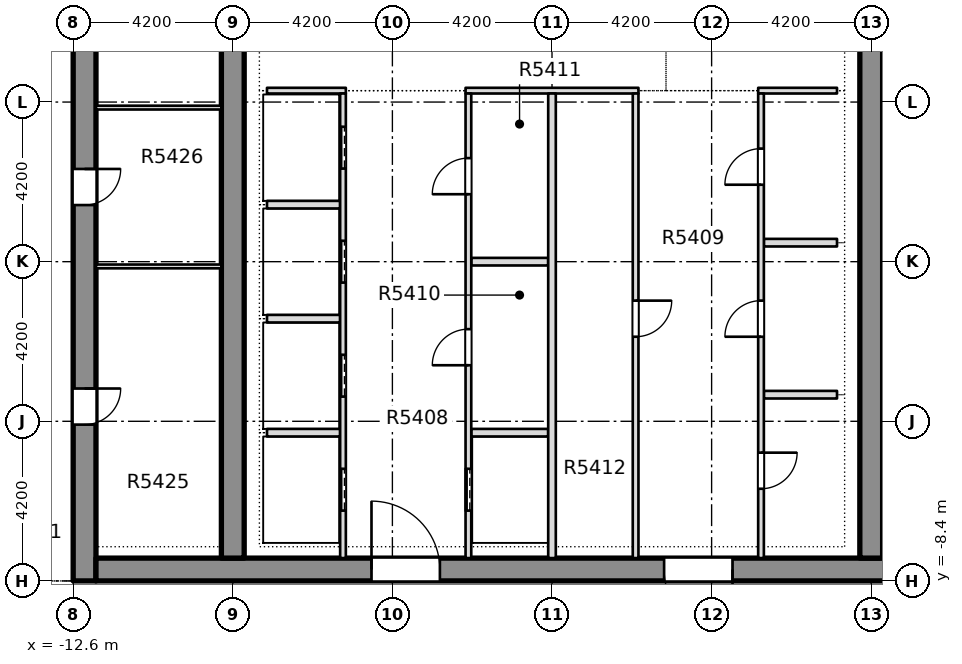
"""IFC4 building model, lengths in metres.
Left out: names, types, materials, properties, quantities, classifications, styles, units other than length and angle.
Written with IfcOpenShell. Run it as: python <this file> out.ifc"""

import sys

from ifc_helpers import new_model, si_unit, direction, frame, frame_2d, origin, place, context, subcontext, project, spatial, rectangle, extrude, element, fill, save


model = new_model("IFC4")
c1 = context("Model", 3, precision=1e-05, world=origin(), true_north=direction((0.0, 1.0)))
c2 = subcontext(c1, "Body", "Model", "MODEL_VIEW")
j1 = project(units=[si_unit("LENGTHUNIT", "METRE"), si_unit("PLANEANGLEUNIT", "RADIAN")], contexts=[c1])
p1 = place(None, origin())
s1 = spatial("IfcSite", under=j1, at=p1, CompositionType="ELEMENT")
p2 = place(p1, origin())
s2 = spatial("IfcBuilding", under=s1, at=p2, CompositionType="ELEMENT")
p3 = place(p2, frame((0.0, 0.0, 206.6)))
s3 = spatial("IfcBuildingStorey", under=s2, at=p3, CompositionType="ELEMENT", Elevation=206.6)
p4 = place(p3, frame((-12.3, -8.4, -0.4), z_axis=(0.0, 0.0, 1.0), x_axis=(0.0, 1.0, 0.0)))
e1 = element("IfcWall", 1, at=p4, inside=s3, PredefinedType="SHEAR", context=c2, shape_type="SweptSolid", body=[
    extrude(rectangle(XDim=30.15, YDim=0.6, at=frame_2d((15.075, 0.0))), origin(), (0.0, 0.0, 1.0), 3.45),
])
p5 = place(p4, frame((4.113, 0.0, 0.4)))
e2 = element("IfcOpeningElement", 2, at=p5, cuts=e1, PredefinedType="OPENING", context=c2, shape_type="SweptSolid", body=[
    extrude(rectangle(XDim=0.95, YDim=2.1, at=frame_2d((0.475, 1.05))), frame((0.0, 0.31, 0.0), z_axis=(0.0, -1.0, 0.0), x_axis=(1.0, 0.0, 0.0)), (0.0, 0.0, 1.0), 0.62),
])
p6 = place(p4, frame((9.89, 0.0, 0.4)))
e3 = element("IfcOpeningElement", 3, at=p6, cuts=e1, PredefinedType="OPENING", context=c2, shape_type="SweptSolid", body=[
    extrude(rectangle(XDim=0.95, YDim=2.1, at=frame_2d((0.475, 1.05))), frame((0.0, 0.31, 0.0), z_axis=(0.0, -1.0, 0.0), x_axis=(1.0, 0.0, 0.0)), (0.0, 0.0, 1.0), 0.62),
])
p7 = place(p4, frame((15.052, 0.0, 0.4)))
e4 = element("IfcOpeningElement", 4, at=p7, cuts=e1, PredefinedType="OPENING", context=c2, shape_type="SweptSolid", body=[
    extrude(rectangle(XDim=0.95, YDim=2.1, at=frame_2d((0.475, 1.05))), frame((0.0, 0.31, 0.0), z_axis=(0.0, -1.0, 0.0), x_axis=(1.0, 0.0, 0.0)), (0.0, 0.0, 1.0), 0.62),
])
p8 = place(p4, frame((22.144, 0.0, 0.4)))
e5 = element("IfcOpeningElement", 5, at=p8, cuts=e1, PredefinedType="OPENING", context=c2, shape_type="SweptSolid", body=[
    extrude(rectangle(XDim=0.95, YDim=2.1, at=frame_2d((0.475, 1.05))), frame((0.0, 0.31, 0.0), z_axis=(0.0, -1.0, 0.0), x_axis=(1.0, 0.0, 0.0)), (0.0, 0.0, 1.0), 0.62),
])
p9 = place(p4, frame((24.998, 0.0, 0.4)))
e6 = element("IfcOpeningElement", 6, at=p9, cuts=e1, PredefinedType="OPENING", context=c2, shape_type="SweptSolid", body=[
    extrude(rectangle(XDim=0.95, YDim=2.1, at=frame_2d((0.475, 1.05))), frame((0.0, 0.31, 0.0), z_axis=(0.0, -1.0, 0.0), x_axis=(1.0, 0.0, 0.0)), (0.0, 0.0, 1.0), 0.62),
])
p10 = place(p4, frame((27.605, 0.0, 0.4)))
e7 = element("IfcOpeningElement", 7, at=p10, cuts=e1, PredefinedType="OPENING", context=c2, shape_type="SweptSolid", body=[
    extrude(rectangle(XDim=0.95, YDim=2.1, at=frame_2d((0.475, 1.05))), frame((0.0, 0.31, 0.0), z_axis=(0.0, -1.0, 0.0), x_axis=(1.0, 0.0, 0.0)), (0.0, 0.0, 1.0), 0.62),
])
p11 = place(p4, frame((19.3, 0.0, 0.4)))
e8 = element("IfcOpeningElement", 8, at=p11, cuts=e1, PredefinedType="OPENING", context=c2, shape_type="SweptSolid", body=[
    extrude(rectangle(XDim=1.2, YDim=2.1, at=frame_2d((0.6, 1.05))), frame((0.0, 0.31, 0.0), z_axis=(0.0, -1.0, 0.0), x_axis=(1.0, 0.0, 0.0)), (0.0, 0.0, 1.0), 0.62),
])
p12 = place(p3, frame((-12.0, -8.1, -0.4), z_axis=(0.0, 0.0, 1.0), x_axis=(1.0, 0.0, 0.0)))
e9 = element("IfcWall", 9, at=p12, inside=s3, PredefinedType="SHEAR", context=c2, shape_type="SweptSolid", body=[
    extrude(rectangle(XDim=24.0, YDim=0.6, at=frame_2d((12.0, 0.0))), origin(), (0.0, 0.0, 1.0), 3.45),
])
p13 = place(p12, frame((7.25, 0.0, 0.4)))
e10 = element("IfcOpeningElement", 10, at=p13, cuts=e9, PredefinedType="OPENING", context=c2, shape_type="SweptSolid", body=[
    extrude(rectangle(XDim=1.8, YDim=2.1, at=frame_2d((0.9, 1.05))), frame((0.0, 0.31, 0.0), z_axis=(0.0, -1.0, 0.0), x_axis=(1.0, 0.0, 0.0)), (0.0, 0.0, 1.0), 0.62),
])
p14 = place(p12, frame((14.95, 0.0, 0.4)))
e11 = element("IfcOpeningElement", 11, at=p14, cuts=e9, PredefinedType="OPENING", context=c2, shape_type="SweptSolid", body=[
    extrude(rectangle(XDim=1.8, YDim=2.1, at=frame_2d((0.9, 1.05))), frame((0.0, 0.31, 0.0), z_axis=(0.0, -1.0, 0.0), x_axis=(1.0, 0.0, 0.0)), (0.0, 0.0, 1.0), 0.62),
])
p15 = place(p3, frame((-8.4, -7.8, -0.4), z_axis=(0.0, 0.0, 1.0), x_axis=(0.0, 1.0, 0.0)))
e12 = element("IfcWall", 12, at=p15, inside=s3, PredefinedType="SHEAR", context=c2, shape_type="SweptSolid", body=[
    extrude(rectangle(XDim=28.95, YDim=0.6, at=frame_2d((14.475, 0.0))), origin(), (0.0, 0.0, 1.0), 3.45),
])
p16 = place(p15, frame((18.7, 0.0, 0.4)))
e13 = element("IfcOpeningElement", 13, at=p16, cuts=e12, PredefinedType="OPENING", context=c2, shape_type="SweptSolid", body=[
    extrude(rectangle(XDim=1.2, YDim=2.1, at=frame_2d((0.6, 1.05))), frame((0.0, 0.31, 0.0), z_axis=(0.0, -1.0, 0.0), x_axis=(1.0, 0.0, 0.0)), (0.0, 0.0, 1.0), 0.62),
])
p17 = place(p3, frame((8.4, -7.8, -0.4), z_axis=(0.0, 0.0, 1.0), x_axis=(0.0, 1.0, 0.0)))
e14 = element("IfcWall", 14, at=p17, inside=s3, PredefinedType="SHEAR", context=c2, shape_type="SweptSolid", body=[
    extrude(rectangle(XDim=28.95, YDim=0.6, at=frame_2d((14.475, 0.0))), origin(), (0.0, 0.0, 1.0), 3.45),
])
p18 = place(p17, frame((18.7, 0.0, 0.4)))
e15 = element("IfcOpeningElement", 15, at=p18, cuts=e14, PredefinedType="OPENING", context=c2, shape_type="SweptSolid", body=[
    extrude(rectangle(XDim=1.2, YDim=2.1, at=frame_2d((0.6, 1.05))), frame((0.0, 0.31, 0.0), z_axis=(0.0, -1.0, 0.0), x_axis=(1.0, 0.0, 0.0)), (0.0, 0.0, 1.0), 0.62),
])
p19 = place(p3, frame((-7.5, -4.5, 0.0), z_axis=(0.0, 0.0, 1.0), x_axis=(1.0, 0.0, 0.0)))
e16 = element("IfcWall", 16, at=p19, inside=s3, PredefinedType="PARTITIONING", context=c2, shape_type="SweptSolid", body=[
    extrude(rectangle(XDim=1.925, YDim=0.2, at=frame_2d((0.962, 0.0))), origin(), (0.0, 0.0, 1.0), 3.05),
])
p20 = place(p3, frame((-2.125, -4.5, 0.0), z_axis=(0.0, 0.0, 1.0), x_axis=(1.0, 0.0, 0.0)))
e17 = element("IfcWall", 17, at=p20, inside=s3, PredefinedType="PARTITIONING", context=c2, shape_type="SweptSolid", body=[
    extrude(rectangle(XDim=2.025, YDim=0.2, at=frame_2d((1.012, 0.0))), origin(), (0.0, 0.0, 1.0), 3.05),
])
for number, where, z_axis, x_axis in (
    (18, (5.575, -3.5, 0.0), (0.0, 0.0, 1.0), (1.0, 0.0, 0.0)),
    (19, (-7.5, -1.5, 0.0), (0.0, 0.0, 1.0), (1.0, 0.0, 0.0)),
):
    element("IfcWall", number, at=place(p3, frame(where, z_axis=z_axis, x_axis=x_axis)), inside=s3, PredefinedType="PARTITIONING", context=c2, shape_type="SweptSolid", body=[
        extrude(rectangle(XDim=1.925, YDim=0.2, at=frame_2d((0.962, 0.0))), origin(), (0.0, 0.0, 1.0), 3.05),
    ])
p21 = place(p3, frame((-2.125, 0.0, 0.0), z_axis=(0.0, 0.0, 1.0), x_axis=(1.0, 0.0, 0.0)))
e20 = element("IfcWall", 20, at=p21, inside=s3, PredefinedType="PARTITIONING", context=c2, shape_type="SweptSolid", body=[
    extrude(rectangle(XDim=2.025, YDim=0.2, at=frame_2d((1.012, 0.0))), origin(), (0.0, 0.0, 1.0), 3.05),
])
for number, where, z_axis, x_axis in (
    (21, (5.575, 0.5, 0.0), (0.0, 0.0, 1.0), (1.0, 0.0, 0.0)),
    (22, (-7.5, 1.5, 0.0), (0.0, 0.0, 1.0), (1.0, 0.0, 0.0)),
):
    element("IfcWall", number, at=place(p3, frame(where, z_axis=z_axis, x_axis=x_axis)), inside=s3, PredefinedType="PARTITIONING", context=c2, shape_type="SweptSolid", body=[
        extrude(rectangle(XDim=1.925, YDim=0.2, at=frame_2d((0.962, 0.0))), origin(), (0.0, 0.0, 1.0), 3.05),
    ])
p22 = place(p3, frame((-7.5, 4.5, 0.0), z_axis=(0.0, 0.0, 1.0), x_axis=(1.0, 0.0, 0.0)))
e23 = element("IfcWall", 23, at=p22, inside=s3, PredefinedType="PARTITIONING", context=c2, shape_type="SweptSolid", body=[
    extrude(rectangle(XDim=2.075, YDim=0.15, at=frame_2d((1.038, 0.0))), origin(), (0.0, 0.0, 1.0), 3.05),
])
p23 = place(p3, frame((-2.275, 4.5, 0.0), z_axis=(0.0, 0.0, 1.0), x_axis=(1.0, 0.0, 0.0)))
e24 = element("IfcWall", 24, at=p23, inside=s3, PredefinedType="PARTITIONING", context=c2, shape_type="SweptSolid", body=[
    extrude(rectangle(XDim=4.55, YDim=0.15, at=frame_2d((2.275, 0.0))), origin(), (0.0, 0.0, 1.0), 3.05),
])
p24 = place(p3, frame((5.425, 4.5, 0.0), z_axis=(0.0, 0.0, 1.0), x_axis=(1.0, 0.0, 0.0)))
e25 = element("IfcWall", 25, at=p24, inside=s3, PredefinedType="PARTITIONING", context=c2, shape_type="SweptSolid", body=[
    extrude(rectangle(XDim=2.075, YDim=0.15, at=frame_2d((1.038, 0.0))), origin(), (0.0, 0.0, 1.0), 3.05),
])
p25 = place(p3, frame((-5.5, -7.799, 0.0), z_axis=(0.0, 0.0, 1.0), x_axis=(0.0, 1.0, 0.0)))
e26 = element("IfcWall", 26, at=p25, inside=s3, PredefinedType="PARTITIONING", context=c2, shape_type="SweptSolid", body=[
    extrude(rectangle(XDim=12.224, YDim=0.15, at=frame_2d((6.112, 0.0))), origin(), (0.0, 0.0, 1.0), 3.05),
])
p26 = place(p25, frame((1.249, 0.0, 0.0)))
e27 = element("IfcOpeningElement", 27, at=p26, cuts=e26, PredefinedType="OPENING", context=c2, shape_type="SweptSolid", body=[
    extrude(rectangle(XDim=1.1, YDim=2.1, at=frame_2d((0.55, 1.05))), frame((0.0, 0.085, 0.0), z_axis=(0.0, -1.0, 0.0), x_axis=(1.0, 0.0, 0.0)), (0.0, 0.0, 1.0), 0.17),
])
p27 = place(p25, frame((4.249, 0.0, 0.0)))
e28 = element("IfcOpeningElement", 28, at=p27, cuts=e26, PredefinedType="OPENING", context=c2, shape_type="SweptSolid", body=[
    extrude(rectangle(XDim=1.1, YDim=2.1, at=frame_2d((0.55, 1.05))), frame((0.0, 0.085, 0.0), z_axis=(0.0, -1.0, 0.0), x_axis=(1.0, 0.0, 0.0)), (0.0, 0.0, 1.0), 0.17),
])
p28 = place(p25, frame((7.249, 0.0, 0.0)))
e29 = element("IfcOpeningElement", 29, at=p28, cuts=e26, PredefinedType="OPENING", context=c2, shape_type="SweptSolid", body=[
    extrude(rectangle(XDim=1.1, YDim=2.1, at=frame_2d((0.55, 1.05))), frame((0.0, 0.085, 0.0), z_axis=(0.0, -1.0, 0.0), x_axis=(1.0, 0.0, 0.0)), (0.0, 0.0, 1.0), 0.17),
])
p29 = place(p25, frame((10.249, 0.0, 0.0)))
e30 = element("IfcOpeningElement", 30, at=p29, cuts=e26, PredefinedType="OPENING", context=c2, shape_type="SweptSolid", body=[
    extrude(rectangle(XDim=1.1, YDim=2.1, at=frame_2d((0.55, 1.05))), frame((0.0, 0.085, 0.0), z_axis=(0.0, -1.0, 0.0), x_axis=(1.0, 0.0, 0.0)), (0.0, 0.0, 1.0), 0.17),
])
p30 = place(p3, frame((-2.2, -7.799, 0.0), z_axis=(0.0, 0.0, 1.0), x_axis=(0.0, 1.0, 0.0)))
e31 = element("IfcWall", 31, at=p30, inside=s3, PredefinedType="PARTITIONING", context=c2, shape_type="SweptSolid", body=[
    extrude(rectangle(XDim=12.224, YDim=0.15, at=frame_2d((6.112, 0.0))), origin(), (0.0, 0.0, 1.0), 3.05),
])
p31 = place(p30, frame((1.249, 0.0, 0.0)))
e32 = element("IfcOpeningElement", 32, at=p31, cuts=e31, PredefinedType="OPENING", context=c2, shape_type="SweptSolid", body=[
    extrude(rectangle(XDim=1.1, YDim=2.1, at=frame_2d((0.55, 1.05))), frame((0.0, 0.085, 0.0), z_axis=(0.0, -1.0, 0.0), x_axis=(1.0, 0.0, 0.0)), (0.0, 0.0, 1.0), 0.17),
])
p32 = place(p30, frame((5.074, 0.0, 0.0)))
e33 = element("IfcOpeningElement", 33, at=p32, cuts=e31, PredefinedType="OPENING", context=c2, shape_type="SweptSolid", body=[
    extrude(rectangle(XDim=0.95, YDim=2.1, at=frame_2d((0.475, 1.05))), frame((0.0, 0.085, 0.0), z_axis=(0.0, -1.0, 0.0), x_axis=(1.0, 0.0, 0.0)), (0.0, 0.0, 1.0), 0.17),
])
p33 = place(p30, frame((9.574, 0.0, 0.0)))
e34 = element("IfcOpeningElement", 34, at=p33, cuts=e31, PredefinedType="OPENING", context=c2, shape_type="SweptSolid", body=[
    extrude(rectangle(XDim=0.95, YDim=2.1, at=frame_2d((0.475, 1.05))), frame((0.0, 0.085, 0.0), z_axis=(0.0, -1.0, 0.0), x_axis=(1.0, 0.0, 0.0)), (0.0, 0.0, 1.0), 0.17),
])
p34 = place(p3, frame((0.0, -7.799, 0.0), z_axis=(0.0, 0.0, 1.0), x_axis=(0.0, 1.0, 0.0)))
e35 = element("IfcWall", 35, at=p34, inside=s3, PredefinedType="PARTITIONING", context=c2, shape_type="SweptSolid", body=[
    extrude(rectangle(XDim=12.224, YDim=0.2, at=frame_2d((6.112, 0.0))), origin(), (0.0, 0.0, 1.0), 3.05),
])
p35 = place(p3, frame((2.2, -7.799, 0.0), z_axis=(0.0, 0.0, 1.0), x_axis=(0.0, 1.0, 0.0)))
e36 = element("IfcWall", 36, at=p35, inside=s3, PredefinedType="PARTITIONING", context=c2, shape_type="SweptSolid", body=[
    extrude(rectangle(XDim=12.224, YDim=0.15, at=frame_2d((6.112, 0.0))), origin(), (0.0, 0.0, 1.0), 3.05),
])
p36 = place(p35, frame((5.824, 0.0, 0.0)))
e37 = element("IfcOpeningElement", 37, at=p36, cuts=e36, PredefinedType="OPENING", context=c2, shape_type="SweptSolid", body=[
    extrude(rectangle(XDim=0.95, YDim=2.1, at=frame_2d((0.475, 1.05))), frame((0.0, 0.085, 0.0), z_axis=(0.0, -1.0, 0.0), x_axis=(1.0, 0.0, 0.0)), (0.0, 0.0, 1.0), 0.17),
])
p37 = place(p3, frame((5.5, -7.799, 0.0), z_axis=(0.0, 0.0, 1.0), x_axis=(0.0, 1.0, 0.0)))
e38 = element("IfcWall", 38, at=p37, inside=s3, PredefinedType="PARTITIONING", context=c2, shape_type="SweptSolid", body=[
    extrude(rectangle(XDim=12.224, YDim=0.15, at=frame_2d((6.112, 0.0))), origin(), (0.0, 0.0, 1.0), 3.05),
])
p38 = place(p37, frame((1.824, 0.0, 0.0)))
e39 = element("IfcOpeningElement", 39, at=p38, cuts=e38, PredefinedType="OPENING", context=c2, shape_type="SweptSolid", body=[
    extrude(rectangle(XDim=0.95, YDim=2.1, at=frame_2d((0.475, 1.05))), frame((0.0, 0.085, 0.0), z_axis=(0.0, -1.0, 0.0), x_axis=(1.0, 0.0, 0.0)), (0.0, 0.0, 1.0), 0.17),
])
p39 = place(p37, frame((5.824, 0.0, 0.0)))
e40 = element("IfcOpeningElement", 40, at=p39, cuts=e38, PredefinedType="OPENING", context=c2, shape_type="SweptSolid", body=[
    extrude(rectangle(XDim=0.95, YDim=2.1, at=frame_2d((0.475, 1.05))), frame((0.0, 0.085, 0.0), z_axis=(0.0, -1.0, 0.0), x_axis=(1.0, 0.0, 0.0)), (0.0, 0.0, 1.0), 0.17),
])
p40 = place(p37, frame((9.824, 0.0, 0.0)))
e41 = element("IfcOpeningElement", 41, at=p40, cuts=e38, PredefinedType="OPENING", context=c2, shape_type="SweptSolid", body=[
    extrude(rectangle(XDim=0.95, YDim=2.1, at=frame_2d((0.475, 1.05))), frame((0.0, 0.085, 0.0), z_axis=(0.0, -1.0, 0.0), x_axis=(1.0, 0.0, 0.0)), (0.0, 0.0, 1.0), 0.17),
])
for number, where, z_axis, x_axis in (
    (42, (-11.999, -0.125, 0.0), (0.0, 0.0, 1.0), (1.0, 0.0, 0.0)),
    (43, (-11.999, 4.054, 0.0), (0.0, 0.0, 1.0), (1.0, 0.0, 0.0)),
):
    element("IfcWall", number, at=place(p3, frame(where, z_axis=z_axis, x_axis=x_axis)), inside=s3, PredefinedType="PARTITIONING", context=c2, shape_type="SweptSolid", body=[
        extrude(rectangle(XDim=3.298, YDim=0.1, at=frame_2d((1.649, 0.0))), origin(), (0.0, 0.0, 1.0), 3.05),
    ])
p41 = place(p26, origin())
e44 = element("IfcDoor", 44, at=p41, inside=s3, OperationType="SLIDING_TO_LEFT", PredefinedType="DOOR", context=c2, shape_type="SweptSolid", body=[
    extrude(rectangle(XDim=1.1, YDim=2.1, at=frame_2d((0.55, 1.05))), frame((0.0, 0.025, 0.0), z_axis=(0.0, -1.0, 0.0), x_axis=(1.0, 0.0, 0.0)), (0.0, 0.0, 1.0), 0.05),
])
fill(e27, e44)
p42 = place(p27, origin())
e45 = element("IfcDoor", 45, at=p42, inside=s3, OperationType="SLIDING_TO_LEFT", PredefinedType="DOOR", context=c2, shape_type="SweptSolid", body=[
    extrude(rectangle(XDim=1.1, YDim=2.1, at=frame_2d((0.55, 1.05))), frame((0.0, 0.025, 0.0), z_axis=(0.0, -1.0, 0.0), x_axis=(1.0, 0.0, 0.0)), (0.0, 0.0, 1.0), 0.05),
])
fill(e28, e45)
p43 = place(p28, origin())
e46 = element("IfcDoor", 46, at=p43, inside=s3, OperationType="SLIDING_TO_LEFT", PredefinedType="DOOR", context=c2, shape_type="SweptSolid", body=[
    extrude(rectangle(XDim=1.1, YDim=2.1, at=frame_2d((0.55, 1.05))), frame((0.0, 0.025, 0.0), z_axis=(0.0, -1.0, 0.0), x_axis=(1.0, 0.0, 0.0)), (0.0, 0.0, 1.0), 0.05),
])
fill(e29, e46)
p44 = place(p29, origin())
e47 = element("IfcDoor", 47, at=p44, inside=s3, OperationType="SLIDING_TO_LEFT", PredefinedType="DOOR", context=c2, shape_type="SweptSolid", body=[
    extrude(rectangle(XDim=1.1, YDim=2.1, at=frame_2d((0.55, 1.05))), frame((0.0, 0.025, 0.0), z_axis=(0.0, -1.0, 0.0), x_axis=(1.0, 0.0, 0.0)), (0.0, 0.0, 1.0), 0.05),
])
fill(e30, e47)
p45 = place(p31, origin())
e48 = element("IfcDoor", 48, at=p45, inside=s3, OperationType="SLIDING_TO_LEFT", PredefinedType="DOOR", context=c2, shape_type="SweptSolid", body=[
    extrude(rectangle(XDim=1.1, YDim=2.1, at=frame_2d((0.55, 1.05))), frame((0.0, 0.025, 0.0), z_axis=(0.0, -1.0, 0.0), x_axis=(1.0, 0.0, 0.0)), (0.0, 0.0, 1.0), 0.05),
])
fill(e32, e48)
p46 = place(p32, origin())
e49 = element("IfcDoor", 49, at=p46, inside=s3, OperationType="SINGLE_SWING_LEFT", PredefinedType="DOOR", context=c2, shape_type="SweptSolid", body=[
    extrude(rectangle(XDim=0.95, YDim=2.1, at=frame_2d((0.475, 1.05))), frame((0.0, 0.025, 0.0), z_axis=(0.0, -1.0, 0.0), x_axis=(1.0, 0.0, 0.0)), (0.0, 0.0, 1.0), 0.05),
])
fill(e33, e49)
p47 = place(p33, origin())
e50 = element("IfcDoor", 50, at=p47, inside=s3, OperationType="SINGLE_SWING_RIGHT", PredefinedType="DOOR", context=c2, shape_type="SweptSolid", body=[
    extrude(rectangle(XDim=0.95, YDim=2.1, at=frame_2d((0.475, 1.05))), frame((0.0, 0.025, 0.0), z_axis=(0.0, -1.0, 0.0), x_axis=(1.0, 0.0, 0.0)), (0.0, 0.0, 1.0), 0.05),
])
fill(e34, e50)
p48 = place(p36, origin())
e51 = element("IfcDoor", 51, at=p48, inside=s3, OperationType="SINGLE_SWING_RIGHT", PredefinedType="DOOR", context=c2, shape_type="SweptSolid", body=[
    extrude(rectangle(XDim=0.95, YDim=2.1, at=frame_2d((0.475, 1.05))), frame((0.0, 0.025, 0.0), z_axis=(0.0, -1.0, 0.0), x_axis=(1.0, 0.0, 0.0)), (0.0, 0.0, 1.0), 0.05),
])
fill(e37, e51)
p49 = place(p38, origin())
e52 = element("IfcDoor", 52, at=p49, inside=s3, OperationType="SINGLE_SWING_LEFT", PredefinedType="DOOR", context=c2, shape_type="SweptSolid", body=[
    extrude(rectangle(XDim=0.95, YDim=2.1, at=frame_2d((0.475, 1.05))), frame((0.0, 0.025, 0.0), z_axis=(0.0, -1.0, 0.0), x_axis=(1.0, 0.0, 0.0)), (0.0, 0.0, 1.0), 0.05),
])
fill(e39, e52)
p50 = place(p39, origin())
e53 = element("IfcDoor", 53, at=p50, inside=s3, OperationType="SINGLE_SWING_LEFT", PredefinedType="DOOR", context=c2, shape_type="SweptSolid", body=[
    extrude(rectangle(XDim=0.95, YDim=2.1, at=frame_2d((0.475, 1.05))), frame((0.0, 0.025, 0.0), z_axis=(0.0, -1.0, 0.0), x_axis=(1.0, 0.0, 0.0)), (0.0, 0.0, 1.0), 0.05),
])
fill(e40, e53)
p51 = place(p40, origin())
e54 = element("IfcDoor", 54, at=p51, inside=s3, OperationType="SINGLE_SWING_RIGHT", PredefinedType="DOOR", context=c2, shape_type="SweptSolid", body=[
    extrude(rectangle(XDim=0.95, YDim=2.1, at=frame_2d((0.475, 1.05))), frame((0.0, 0.025, 0.0), z_axis=(0.0, -1.0, 0.0), x_axis=(1.0, 0.0, 0.0)), (0.0, 0.0, 1.0), 0.05),
])
fill(e41, e54)
p52 = place(p13, origin())
e55 = element("IfcDoor", 55, at=p52, inside=s3, OperationType="SINGLE_SWING_LEFT", PredefinedType="DOOR", context=c2, shape_type="SweptSolid", body=[
    extrude(rectangle(XDim=1.8, YDim=2.1, at=frame_2d((0.9, 1.05))), frame((0.0, 0.025, 0.0), z_axis=(0.0, -1.0, 0.0), x_axis=(1.0, 0.0, 0.0)), (0.0, 0.0, 1.0), 0.05),
])
fill(e10, e55)
p53 = place(p14, origin())
e56 = element("IfcDoor", 56, at=p53, inside=s3, OperationType="SINGLE_SWING_LEFT", PredefinedType="DOOR", context=c2, shape_type="SweptSolid", body=[
    extrude(rectangle(XDim=1.8, YDim=2.1, at=frame_2d((0.9, 1.05))), frame((0.0, 0.025, 0.0), z_axis=(0.0, -1.0, 0.0), x_axis=(1.0, 0.0, 0.0)), (0.0, 0.0, 1.0), 0.05),
])
fill(e11, e56)
p54 = place(p5, origin())
e57 = element("IfcDoor", 57, at=p54, inside=s3, OperationType="SINGLE_SWING_LEFT", PredefinedType="DOOR", context=c2, shape_type="SweptSolid", body=[
    extrude(rectangle(XDim=0.95, YDim=2.1, at=frame_2d((0.475, 1.05))), frame((0.0, 0.025, 0.0), z_axis=(0.0, -1.0, 0.0), x_axis=(1.0, 0.0, 0.0)), (0.0, 0.0, 1.0), 0.05),
])
fill(e2, e57)
p55 = place(p6, origin())
e58 = element("IfcDoor", 58, at=p55, inside=s3, OperationType="SINGLE_SWING_LEFT", PredefinedType="DOOR", context=c2, shape_type="SweptSolid", body=[
    extrude(rectangle(XDim=0.95, YDim=2.1, at=frame_2d((0.475, 1.05))), frame((0.0, 0.025, 0.0), z_axis=(0.0, -1.0, 0.0), x_axis=(1.0, 0.0, 0.0)), (0.0, 0.0, 1.0), 0.05),
])
fill(e3, e58)
save(model, sys.argv[1])
